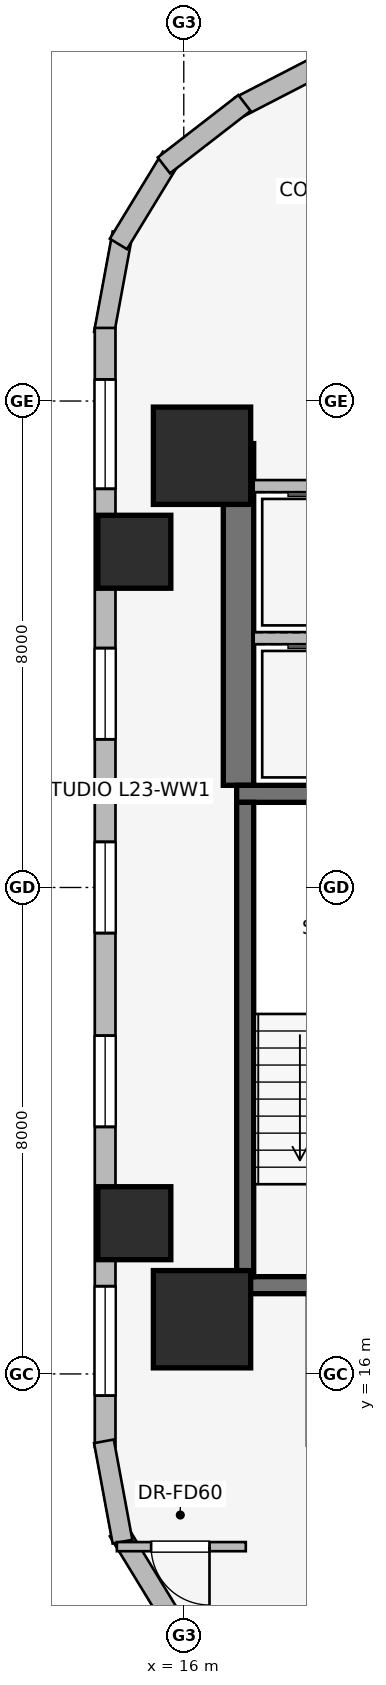
"""IFC4 building model, lengths in metres.
Left out: names, types, materials, properties, quantities, classifications, styles, units other than length and angle.
Written with IfcOpenShell. Run it as: python <this file> out.ifc"""

import sys

from ifc_helpers import new_model, si_unit, direction, frame, frame_2d, origin, origin_2d, place, context, subcontext, project, spatial, rectangle, extrude, element, fill, save


model = new_model("IFC4")
c1 = context("Model", 3, precision=1e-05, world=origin(), true_north=direction((0.0, 1.0)))
c2 = subcontext(c1, "Body", "Model", "MODEL_VIEW")
j1 = project(units=[si_unit("LENGTHUNIT", "METRE"), si_unit("PLANEANGLEUNIT", "RADIAN")], contexts=[c1])
p1 = place(None, origin())
s1 = spatial("IfcSite", under=j1, at=p1, CompositionType="ELEMENT")
p2 = place(p1, origin())
s2 = spatial("IfcBuilding", under=s1, at=p2, CompositionType="ELEMENT")
p3 = place(p2, frame((0.0, 0.0, 89.05)))
s3 = spatial("IfcBuildingStorey", under=s2, at=p3, CompositionType="ELEMENT", Elevation=89.05)
p4 = place(p3, frame((16.9, 25.68, 0.0), z_axis=(0.0, 0.0, 1.0), x_axis=(0.0, 1.0, 0.0)))
e1 = element("IfcWall", 1, at=p4, inside=s3, PredefinedType="SHEAR", context=c2, shape_type="SweptSolid", body=[
    extrude(rectangle(XDim=5.62, YDim=0.5, at=frame_2d((2.81, 0.0))), origin(), (0.0, 0.0, 1.0), 3.65),
])
for number, where, z_axis, x_axis in (
    (2, (16.87, 17.46, 0.0), (0.0, 0.0, 1.0), (1.0, 0.0, 0.0)),
    (3, (20.63, 25.54, 0.0), (0.0, 0.0, 1.0), (-1.0, 0.0, 0.0)),
):
    element("IfcWall", number, at=place(p3, frame(where, z_axis=z_axis, x_axis=x_axis)), inside=s3, PredefinedType="SHEAR", context=c2, shape_type="SweptSolid", body=[
        extrude(rectangle(XDim=3.76, YDim=0.28, at=frame_2d((1.88, 0.0))), origin(), (0.0, 0.0, 1.0), 3.65),
    ])
p5 = place(p3, frame((17.01, 25.4, 0.0), z_axis=(0.0, 0.0, 1.0), x_axis=(0.0, -1.0, 0.0)))
e4 = element("IfcWall", 4, at=p5, inside=s3, PredefinedType="SHEAR", context=c2, shape_type="SweptSolid", body=[
    extrude(rectangle(XDim=7.8, YDim=0.28, at=frame_2d((3.9, 0.0))), origin(), (0.0, 0.0, 1.0), 3.65),
])
for number, where, z_axis, x_axis in (
    (5, (16.3, 16.9, 0.0), (0.0, 0.0, 1.0), (1.0, 0.0, 0.0)),
    (6, (16.3, 31.1, 0.0), (0.0, 0.0, 1.0), (1.0, 0.0, 0.0)),
):
    element("IfcColumn", number, at=place(p3, frame(where, z_axis=z_axis, x_axis=x_axis)), inside=s3, PredefinedType="COLUMN", context=c2, shape_type="SweptSolid", body=[
        extrude(rectangle(XDim=1.6, YDim=1.6, at=origin_2d()), origin(), (0.0, 0.0, 1.0), 3.65),
    ])
for number, where, z_axis, x_axis in (
    (7, (15.187, 29.521, 0.0), (0.0, 0.0, 1.0), (1.0, 0.0, 0.0)),
    (8, (15.187, 18.479, 0.0), (0.0, 0.0, 1.0), (1.0, 0.0, 0.0)),
):
    element("IfcColumn", number, at=place(p3, frame(where, z_axis=z_axis, x_axis=x_axis)), inside=s3, PredefinedType="COLUMN", context=c2, shape_type="SweptSolid", body=[
        extrude(rectangle(XDim=1.2, YDim=1.2, at=origin_2d()), origin(), (0.0, 0.0, 1.0), 3.65),
    ])
p6 = place(p3, frame((16.924, 36.841, 0.0), z_axis=(0.0, 0.0, 1.0), x_axis=(0.888634413993, 0.458616264721, 0.0)))
e9 = element("IfcWall", 9, at=p6, inside=s3, PredefinedType="STANDARD", context=c2, shape_type="SweptSolid", body=[
    extrude(rectangle(XDim=20.531, YDim=0.34, at=frame_2d((10.266, 0.0))), origin(), (0.0, 0.0, 1.0), 2.684),
])
p7 = place(p6, frame((5.111, 0.0, 0.75)))
e10 = element("IfcOpeningElement", 10, at=p7, cuts=e9, PredefinedType="OPENING", context=c2, shape_type="SweptSolid", body=[
    extrude(rectangle(XDim=1.8, YDim=1.5, at=frame_2d((0.9, 0.75))), frame((0.0, 0.18, 0.0), z_axis=(0.0, -1.0, 0.0), x_axis=(1.0, 0.0, 0.0)), (0.0, 0.0, 1.0), 0.36),
])
p8 = place(p6, frame((7.44, 0.0, 0.75)))
e11 = element("IfcOpeningElement", 11, at=p8, cuts=e9, PredefinedType="OPENING", context=c2, shape_type="SweptSolid", body=[
    extrude(rectangle(XDim=1.8, YDim=1.5, at=frame_2d((0.9, 0.75))), frame((0.0, 0.18, 0.0), z_axis=(0.0, -1.0, 0.0), x_axis=(1.0, 0.0, 0.0)), (0.0, 0.0, 1.0), 0.36),
])
p9 = place(p6, frame((10.843, 0.0, 0.75)))
e12 = element("IfcOpeningElement", 12, at=p9, cuts=e9, PredefinedType="OPENING", context=c2, shape_type="SweptSolid", body=[
    extrude(rectangle(XDim=1.5, YDim=1.5, at=frame_2d((0.75, 0.75))), frame((0.0, 0.18, 0.0), z_axis=(0.0, -1.0, 0.0), x_axis=(1.0, 0.0, 0.0)), (0.0, 0.0, 1.0), 0.36),
])
p10 = place(p6, frame((13.571, 0.0, 0.75)))
e13 = element("IfcOpeningElement", 13, at=p10, cuts=e9, PredefinedType="OPENING", context=c2, shape_type="SweptSolid", body=[
    extrude(rectangle(XDim=1.5, YDim=1.5, at=frame_2d((0.75, 0.75))), frame((0.0, 0.18, 0.0), z_axis=(0.0, -1.0, 0.0), x_axis=(1.0, 0.0, 0.0)), (0.0, 0.0, 1.0), 0.36),
])
p11 = place(p6, frame((17.476, 0.0, 0.75)))
e14 = element("IfcOpeningElement", 14, at=p11, cuts=e9, PredefinedType="OPENING", context=c2, shape_type="SweptSolid", body=[
    extrude(rectangle(XDim=1.05, YDim=1.4, at=frame_2d((0.525, 0.7))), frame((0.0, 0.18, 0.0), z_axis=(0.0, -1.0, 0.0), x_axis=(1.0, 0.0, 0.0)), (0.0, 0.0, 1.0), 0.36),
])
p12 = place(p3, frame((14.687, 33.108, 0.0), z_axis=(0.0, 0.0, 1.0), x_axis=(0.181714143354, 0.983351397063, 0.0)))
e15 = element("IfcWall", 15, at=p12, inside=s3, PredefinedType="STANDARD", context=c2, shape_type="SweptSolid", body=[
    extrude(rectangle(XDim=1.678, YDim=0.33, at=frame_2d((0.839, 0.0))), origin(), (0.0, 0.0, 1.0), 3.39),
])
p13 = place(p3, frame((14.925, 34.583, 0.0), z_axis=(0.0, 0.0, 1.0), x_axis=(0.520584129191, 0.853810379671, 0.0)))
e16 = element("IfcWall", 16, at=p13, inside=s3, PredefinedType="STANDARD", context=c2, shape_type="SweptSolid", body=[
    extrude(rectangle(XDim=1.677, YDim=0.33, at=frame_2d((0.838, 0.0))), origin(), (0.0, 0.0, 1.0), 3.39),
])
p14 = place(p3, frame((15.673, 35.875, 0.0), z_axis=(0.0, 0.0, 1.0), x_axis=(0.790691856293, 0.61221433207, 0.0)))
e17 = element("IfcWall", 17, at=p14, inside=s3, PredefinedType="STANDARD", context=c2, shape_type="SweptSolid", body=[
    extrude(rectangle(XDim=1.676, YDim=0.33, at=frame_2d((0.838, 0.0))), origin(), (0.0, 0.0, 1.0), 3.39),
])
p15 = place(p3, frame((14.707, 14.798, 0.0), z_axis=(0.0, 0.0, 1.0), x_axis=(0.0, 1.0, 0.0)))
e18 = element("IfcWall", 18, at=p15, inside=s3, PredefinedType="STANDARD", context=c2, shape_type="SweptSolid", body=[
    extrude(rectangle(XDim=18.404, YDim=0.34, at=frame_2d((9.202, 0.0))), origin(), (0.0, 0.0, 1.0), 2.684),
])
p16 = place(p15, frame((0.845, 0.0, 0.75)))
e19 = element("IfcOpeningElement", 19, at=p16, cuts=e18, PredefinedType="OPENING", context=c2, shape_type="SweptSolid", body=[
    extrude(rectangle(XDim=1.8, YDim=1.5, at=frame_2d((0.9, 0.75))), frame((0.0, 0.18, 0.0), z_axis=(0.0, -1.0, 0.0), x_axis=(1.0, 0.0, 0.0)), (0.0, 0.0, 1.0), 0.36),
])
p17 = place(p15, frame((5.265, 0.0, 0.75)))
e20 = element("IfcOpeningElement", 20, at=p17, cuts=e18, PredefinedType="OPENING", context=c2, shape_type="SweptSolid", body=[
    extrude(rectangle(XDim=1.5, YDim=1.5, at=frame_2d((0.75, 0.75))), frame((0.0, 0.18, 0.0), z_axis=(0.0, -1.0, 0.0), x_axis=(1.0, 0.0, 0.0)), (0.0, 0.0, 1.0), 0.36),
])
p18 = place(p15, frame((8.452, 0.0, 0.75)))
e21 = element("IfcOpeningElement", 21, at=p18, cuts=e18, PredefinedType="OPENING", context=c2, shape_type="SweptSolid", body=[
    extrude(rectangle(XDim=1.5, YDim=1.5, at=frame_2d((0.75, 0.75))), frame((0.0, 0.18, 0.0), z_axis=(0.0, -1.0, 0.0), x_axis=(1.0, 0.0, 0.0)), (0.0, 0.0, 1.0), 0.36),
])
p19 = place(p15, frame((11.639, 0.0, 0.75)))
e22 = element("IfcOpeningElement", 22, at=p19, cuts=e18, PredefinedType="OPENING", context=c2, shape_type="SweptSolid", body=[
    extrude(rectangle(XDim=1.5, YDim=1.5, at=frame_2d((0.75, 0.75))), frame((0.0, 0.18, 0.0), z_axis=(0.0, -1.0, 0.0), x_axis=(1.0, 0.0, 0.0)), (0.0, 0.0, 1.0), 0.36),
])
p20 = place(p15, frame((15.758, 0.0, 0.75)))
e23 = element("IfcOpeningElement", 23, at=p20, cuts=e18, PredefinedType="OPENING", context=c2, shape_type="SweptSolid", body=[
    extrude(rectangle(XDim=1.8, YDim=1.5, at=frame_2d((0.9, 0.75))), frame((0.0, 0.18, 0.0), z_axis=(0.0, -1.0, 0.0), x_axis=(1.0, 0.0, 0.0)), (0.0, 0.0, 1.0), 0.36),
])
p21 = place(p3, frame((16.998, 11.099, 0.0), z_axis=(0.0, 0.0, 1.0), x_axis=(-0.790691856293, 0.61221433207, 0.0)))
e24 = element("IfcWall", 24, at=p21, inside=s3, PredefinedType="STANDARD", context=c2, shape_type="SweptSolid", body=[
    extrude(rectangle(XDim=1.676, YDim=0.33, at=frame_2d((0.838, 0.0))), origin(), (0.0, 0.0, 1.0), 3.39),
])
p22 = place(p3, frame((15.798, 11.985, 0.0), z_axis=(0.0, 0.0, 1.0), x_axis=(-0.520584129191, 0.853810379671, 0.0)))
e25 = element("IfcWall", 25, at=p22, inside=s3, PredefinedType="STANDARD", context=c2, shape_type="SweptSolid", body=[
    extrude(rectangle(XDim=1.677, YDim=0.33, at=frame_2d((0.838, 0.0))), origin(), (0.0, 0.0, 1.0), 3.39),
])
p23 = place(p3, frame((14.992, 13.242, 0.0), z_axis=(0.0, 0.0, 1.0), x_axis=(-0.181714143354, 0.983351397063, 0.0)))
e26 = element("IfcWall", 26, at=p23, inside=s3, PredefinedType="STANDARD", context=c2, shape_type="SweptSolid", body=[
    extrude(rectangle(XDim=1.678, YDim=0.33, at=frame_2d((0.839, 0.0))), origin(), (0.0, 0.0, 1.0), 3.39),
])
p24 = place(p3, frame((17.15, 28.1, 0.0), z_axis=(0.0, 0.0, 1.0), x_axis=(1.0, 0.0, 0.0)))
e27 = element("IfcWall", 27, at=p24, inside=s3, PredefinedType="PARTITIONING", context=c2, shape_type="SweptSolid", body=[
    extrude(rectangle(XDim=2.5, YDim=0.2, at=frame_2d((1.25, 0.0))), origin(), (0.0, 0.0, 1.0), 3.39),
])
p25 = place(p3, frame((19.65, 30.6, 0.0), z_axis=(0.0, 0.0, 1.0), x_axis=(-1.0, 0.0, 0.0)))
e28 = element("IfcWall", 28, at=p25, inside=s3, PredefinedType="PARTITIONING", context=c2, shape_type="SweptSolid", body=[
    extrude(rectangle(XDim=2.5, YDim=0.2, at=frame_2d((1.25, 0.0))), origin(), (0.0, 0.0, 1.0), 2.29),
])
p26 = place(p3, frame((17.02, 13.16, 0.0), z_axis=(0.0, 0.0, 1.0), x_axis=(-1.0, 0.0, 0.0)))
e29 = element("IfcWall", 29, at=p26, inside=s3, PredefinedType="PARTITIONING", context=c2, shape_type="SweptSolid", body=[
    extrude(rectangle(XDim=2.12, YDim=0.15, at=frame_2d((1.06, 0.0))), origin(), (0.0, 0.0, 1.0), 3.39),
])
p27 = place(p26, frame((0.597, 0.0, 0.0)))
e30 = element("IfcOpeningElement", 30, at=p27, cuts=e29, PredefinedType="OPENING", context=c2, shape_type="SweptSolid", body=[
    extrude(rectangle(XDim=0.96, YDim=2.0, at=frame_2d((0.48, 1.0))), frame((0.0, 0.085, 0.0), z_axis=(0.0, -1.0, 0.0), x_axis=(1.0, 0.0, 0.0)), (0.0, 0.0, 1.0), 0.17),
])
p28 = place(p16, origin())
e31 = element("IfcWindow", 31, at=p28, inside=s3, PartitioningType="SINGLE_PANEL", PredefinedType="WINDOW", context=c2, shape_type="SweptSolid", body=[
    extrude(rectangle(XDim=1.8, YDim=1.5, at=frame_2d((0.9, 0.75))), frame((0.0, 0.03, 0.0), z_axis=(0.0, -1.0, 0.0), x_axis=(1.0, 0.0, 0.0)), (0.0, 0.0, 1.0), 0.06),
])
fill(e19, e31)
p29 = place(p17, origin())
e32 = element("IfcWindow", 32, at=p29, inside=s3, PartitioningType="SINGLE_PANEL", PredefinedType="WINDOW", context=c2, shape_type="SweptSolid", body=[
    extrude(rectangle(XDim=1.5, YDim=1.5, at=frame_2d((0.75, 0.75))), frame((0.0, 0.03, 0.0), z_axis=(0.0, -1.0, 0.0), x_axis=(1.0, 0.0, 0.0)), (0.0, 0.0, 1.0), 0.06),
])
fill(e20, e32)
p30 = place(p18, origin())
e33 = element("IfcWindow", 33, at=p30, inside=s3, PartitioningType="SINGLE_PANEL", PredefinedType="WINDOW", context=c2, shape_type="SweptSolid", body=[
    extrude(rectangle(XDim=1.5, YDim=1.5, at=frame_2d((0.75, 0.75))), frame((0.0, 0.03, 0.0), z_axis=(0.0, -1.0, 0.0), x_axis=(1.0, 0.0, 0.0)), (0.0, 0.0, 1.0), 0.06),
])
fill(e21, e33)
p31 = place(p19, origin())
e34 = element("IfcWindow", 34, at=p31, inside=s3, PartitioningType="SINGLE_PANEL", PredefinedType="WINDOW", context=c2, shape_type="SweptSolid", body=[
    extrude(rectangle(XDim=1.5, YDim=1.5, at=frame_2d((0.75, 0.75))), frame((0.0, 0.03, 0.0), z_axis=(0.0, -1.0, 0.0), x_axis=(1.0, 0.0, 0.0)), (0.0, 0.0, 1.0), 0.06),
])
fill(e22, e34)
p32 = place(p20, origin())
e35 = element("IfcWindow", 35, at=p32, inside=s3, PartitioningType="SINGLE_PANEL", PredefinedType="WINDOW", context=c2, shape_type="SweptSolid", body=[
    extrude(rectangle(XDim=1.8, YDim=1.5, at=frame_2d((0.9, 0.75))), frame((0.0, 0.03, 0.0), z_axis=(0.0, -1.0, 0.0), x_axis=(1.0, 0.0, 0.0)), (0.0, 0.0, 1.0), 0.06),
])
fill(e23, e35)
p33 = place(p27, origin())
e36 = element("IfcDoor", 36, at=p33, inside=s3, OperationType="SINGLE_SWING_LEFT", PredefinedType="DOOR", context=c2, shape_type="SweptSolid", body=[
    extrude(rectangle(XDim=0.96, YDim=2.0, at=frame_2d((0.48, 1.0))), frame((0.0, 0.025, 0.0), z_axis=(0.0, -1.0, 0.0), x_axis=(1.0, 0.0, 0.0)), (0.0, 0.0, 1.0), 0.05),
])
fill(e30, e36)
save(model, sys.argv[1])
